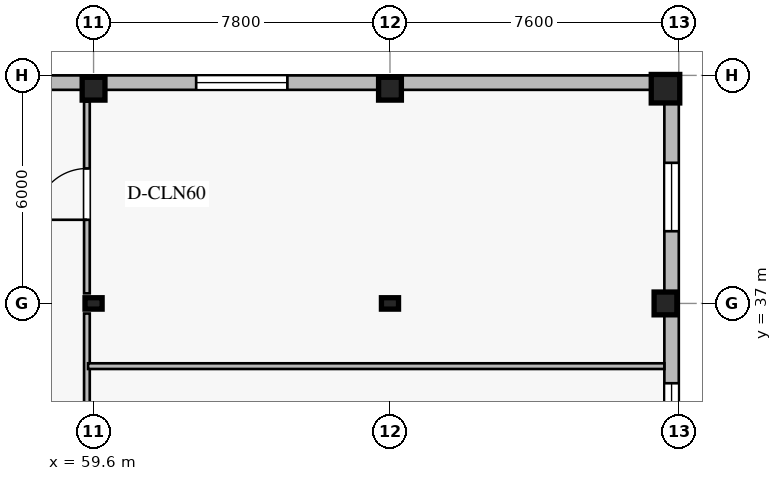
"""IFC4 building model, lengths in metres.
Left out: names, types, materials, properties, quantities, classifications, styles, units other than length and angle.
Written with IfcOpenShell. Run it as: python <this file> out.ifc"""

import sys

from ifc_helpers import new_model, si_unit, direction, frame, frame_2d, origin, origin_2d, place, context, subcontext, project, spatial, rectangle, i_section, extrude, element, fill, save


model = new_model("IFC4")
c1 = context("Model", 3, precision=1e-05, world=origin(), true_north=direction((0.0, 1.0)))
c2 = subcontext(c1, "Body", "Model", "MODEL_VIEW")
j1 = project(units=[si_unit("LENGTHUNIT", "METRE"), si_unit("PLANEANGLEUNIT", "RADIAN")], contexts=[c1])
p1 = place(None, origin())
s1 = spatial("IfcSite", under=j1, at=p1, CompositionType="ELEMENT")
p2 = place(p1, origin())
s2 = spatial("IfcBuilding", under=s1, at=p2, CompositionType="ELEMENT")
p3 = place(p2, frame((0.0, 0.0, 5.2)))
s3 = spatial("IfcBuildingStorey", under=s2, at=p3, CompositionType="ELEMENT", Elevation=5.2)
p4 = place(p3, frame((59.6, 37.0, 0.0), z_axis=(0.0, 0.0, 1.0), x_axis=(1.0, 0.0, 0.0)))
e1 = element("IfcColumn", 1, at=p4, inside=s3, PredefinedType="COLUMN", context=c2, shape_type="SweptSolid", body=[
    extrude(i_section(OverallWidth=0.3, OverallDepth=0.45, WebThickness=0.014, FlangeThickness=0.026, at=origin_2d()), origin(), (0.0, 0.0, 1.0), 4.6),
])
p5 = place(p3, frame((59.6, 42.65, 0.0), z_axis=(0.0, 0.0, 1.0), x_axis=(1.0, 0.0, 0.0)))
e2 = element("IfcColumn", 2, at=p5, inside=s3, PredefinedType="COLUMN", context=c2, shape_type="SweptSolid", body=[
    extrude(rectangle(XDim=0.6, YDim=0.6, at=origin_2d()), origin(), (0.0, 0.0, 1.0), 4.6),
])
p6 = place(p3, frame((67.4, 37.0, 0.0), z_axis=(0.0, 0.0, 1.0), x_axis=(1.0, 0.0, 0.0)))
e3 = element("IfcColumn", 3, at=p6, inside=s3, PredefinedType="COLUMN", context=c2, shape_type="SweptSolid", body=[
    extrude(i_section(OverallWidth=0.3, OverallDepth=0.45, WebThickness=0.014, FlangeThickness=0.026, at=origin_2d()), origin(), (0.0, 0.0, 1.0), 4.6),
])
for number, where, z_axis, x_axis in (
    (4, (67.4, 42.65, 0.0), (0.0, 0.0, 1.0), (1.0, 0.0, 0.0)),
    (5, (74.65, 37.0, 0.0), (0.0, 0.0, 1.0), (1.0, 0.0, 0.0)),
):
    element("IfcColumn", number, at=place(p3, frame(where, z_axis=z_axis, x_axis=x_axis)), inside=s3, PredefinedType="COLUMN", context=c2, shape_type="SweptSolid", body=[
        extrude(rectangle(XDim=0.6, YDim=0.6, at=origin_2d()), origin(), (0.0, 0.0, 1.0), 4.6),
    ])
p7 = place(p3, frame((74.65, 42.65, 0.0), z_axis=(0.0, 0.0, 1.0), x_axis=(1.0, 0.0, 0.0)))
e6 = element("IfcColumn", 6, at=p7, inside=s3, PredefinedType="COLUMN", context=c2, shape_type="SweptSolid", body=[
    extrude(rectangle(XDim=0.75, YDim=0.75, at=origin_2d()), origin(), (0.0, 0.0, 1.0), 4.6),
])
p8 = place(p3, frame((52.0, 42.81, 0.0), z_axis=(0.0, 0.0, 1.0), x_axis=(1.0, 0.0, 0.0)))
e7 = element("IfcWall", 7, at=p8, inside=s3, PredefinedType="STANDARD", context=c2, shape_type="SweptSolid", body=[
    extrude(rectangle(XDim=23.0, YDim=0.38, at=frame_2d((11.5, 0.0))), origin(), (0.0, 0.0, 1.0), 4.34),
])
p9 = place(p8, frame((10.3, 0.0, 0.95)))
e8 = element("IfcOpeningElement", 8, at=p9, cuts=e7, PredefinedType="OPENING", context=c2, shape_type="SweptSolid", body=[
    extrude(rectangle(XDim=2.4, YDim=1.8, at=frame_2d((1.2, 0.9))), frame((0.0, 0.2, 0.0), z_axis=(0.0, -1.0, 0.0), x_axis=(1.0, 0.0, 0.0)), (0.0, 0.0, 1.0), 0.4),
])
p10 = place(p3, frame((74.81, 42.62, 0.0), z_axis=(0.0, 0.0, 1.0), x_axis=(0.0, -1.0, 0.0)))
e9 = element("IfcWall", 9, at=p10, inside=s3, PredefinedType="STANDARD", context=c2, shape_type="SweptSolid", body=[
    extrude(rectangle(XDim=35.24, YDim=0.38, at=frame_2d((17.62, 0.0))), origin(), (0.0, 0.0, 1.0), 4.34),
])
p11 = place(p10, frame((31.52, 0.0, 0.9)))
e10 = element("IfcOpeningElement", 10, at=p11, cuts=e9, PredefinedType="OPENING", context=c2, shape_type="SweptSolid", body=[
    extrude(rectangle(XDim=1.8, YDim=1.8, at=frame_2d((0.9, 0.9))), frame((0.0, 0.2, 0.0), z_axis=(0.0, -1.0, 0.0), x_axis=(1.0, 0.0, 0.0)), (0.0, 0.0, 1.0), 0.4),
])
p12 = place(p10, frame((25.72, 0.0, 0.9)))
e11 = element("IfcOpeningElement", 11, at=p12, cuts=e9, PredefinedType="OPENING", context=c2, shape_type="SweptSolid", body=[
    extrude(rectangle(XDim=1.8, YDim=1.8, at=frame_2d((0.9, 0.9))), frame((0.0, 0.2, 0.0), z_axis=(0.0, -1.0, 0.0), x_axis=(1.0, 0.0, 0.0)), (0.0, 0.0, 1.0), 0.4),
])
p13 = place(p10, frame((19.72, 0.0, 0.9)))
e12 = element("IfcOpeningElement", 12, at=p13, cuts=e9, PredefinedType="OPENING", context=c2, shape_type="SweptSolid", body=[
    extrude(rectangle(XDim=1.8, YDim=1.8, at=frame_2d((0.9, 0.9))), frame((0.0, 0.2, 0.0), z_axis=(0.0, -1.0, 0.0), x_axis=(1.0, 0.0, 0.0)), (0.0, 0.0, 1.0), 0.4),
])
p14 = place(p10, frame((13.72, 0.0, 0.9)))
e13 = element("IfcOpeningElement", 13, at=p14, cuts=e9, PredefinedType="OPENING", context=c2, shape_type="SweptSolid", body=[
    extrude(rectangle(XDim=1.8, YDim=1.8, at=frame_2d((0.9, 0.9))), frame((0.0, 0.2, 0.0), z_axis=(0.0, -1.0, 0.0), x_axis=(1.0, 0.0, 0.0)), (0.0, 0.0, 1.0), 0.4),
])
p15 = place(p10, frame((7.72, 0.0, 0.9)))
e14 = element("IfcOpeningElement", 14, at=p15, cuts=e9, PredefinedType="OPENING", context=c2, shape_type="SweptSolid", body=[
    extrude(rectangle(XDim=1.8, YDim=1.8, at=frame_2d((0.9, 0.9))), frame((0.0, 0.2, 0.0), z_axis=(0.0, -1.0, 0.0), x_axis=(1.0, 0.0, 0.0)), (0.0, 0.0, 1.0), 0.4),
])
p16 = place(p10, frame((1.92, 0.0, 0.9)))
e15 = element("IfcOpeningElement", 15, at=p16, cuts=e9, PredefinedType="OPENING", context=c2, shape_type="SweptSolid", body=[
    extrude(rectangle(XDim=1.8, YDim=1.8, at=frame_2d((0.9, 0.9))), frame((0.0, 0.2, 0.0), z_axis=(0.0, -1.0, 0.0), x_axis=(1.0, 0.0, 0.0)), (0.0, 0.0, 1.0), 0.4),
])
p17 = place(p3, frame((59.425, 31.265, 0.0), z_axis=(0.0, 0.0, 1.0), x_axis=(0.0, 1.0, 0.0)))
e16 = element("IfcWall", 16, at=p17, inside=s3, PredefinedType="PARTITIONING", context=c2, shape_type="SweptSolid", body=[
    extrude(rectangle(XDim=5.47, YDim=0.15, at=frame_2d((2.735, 0.0))), origin(), (0.0, 0.0, 1.0), 3.98),
])
p18 = place(p3, frame((59.425, 37.265, 0.0), z_axis=(0.0, 0.0, 1.0), x_axis=(0.0, 1.0, 0.0)))
e17 = element("IfcWall", 17, at=p18, inside=s3, PredefinedType="PARTITIONING", context=c2, shape_type="SweptSolid", body=[
    extrude(rectangle(XDim=5.045, YDim=0.15, at=frame_2d((2.522, 0.0))), origin(), (0.0, 0.0, 1.0), 3.98),
])
p19 = place(p18, frame((1.936, 0.0, 0.0)))
e18 = element("IfcOpeningElement", 18, at=p19, cuts=e17, PredefinedType="OPENING", context=c2, shape_type="SweptSolid", body=[
    extrude(rectangle(XDim=1.35, YDim=2.2, at=frame_2d((0.675, 1.1))), frame((0.0, 0.085, 0.0), z_axis=(0.0, -1.0, 0.0), x_axis=(1.0, 0.0, 0.0)), (0.0, 0.0, 1.0), 0.17),
])
p20 = place(p3, frame((59.455, 35.35, 0.0), z_axis=(0.0, 0.0, 1.0), x_axis=(1.0, 0.0, 0.0)))
e19 = element("IfcWall", 19, at=p20, inside=s3, PredefinedType="PARTITIONING", context=c2, shape_type="SweptSolid", body=[
    extrude(rectangle(XDim=15.165, YDim=0.15, at=frame_2d((7.583, 0.0))), origin(), (0.0, 0.0, 1.0), 3.98),
])
p21 = place(p15, origin())
e20 = element("IfcWindow", 20, at=p21, inside=s3, PartitioningType="DOUBLE_PANEL_VERTICAL", PredefinedType="WINDOW", context=c2, shape_type="SweptSolid", body=[
    extrude(rectangle(XDim=1.8, YDim=1.8, at=frame_2d((0.9, 0.9))), frame((0.0, 0.03, 0.0), z_axis=(0.0, -1.0, 0.0), x_axis=(1.0, 0.0, 0.0)), (0.0, 0.0, 1.0), 0.06),
])
fill(e14, e20)
p22 = place(p16, origin())
e21 = element("IfcWindow", 21, at=p22, inside=s3, PartitioningType="DOUBLE_PANEL_VERTICAL", PredefinedType="WINDOW", context=c2, shape_type="SweptSolid", body=[
    extrude(rectangle(XDim=1.8, YDim=1.8, at=frame_2d((0.9, 0.9))), frame((0.0, 0.03, 0.0), z_axis=(0.0, -1.0, 0.0), x_axis=(1.0, 0.0, 0.0)), (0.0, 0.0, 1.0), 0.06),
])
fill(e15, e21)
p23 = place(p9, origin())
e22 = element("IfcWindow", 22, at=p23, inside=s3, PartitioningType="TRIPLE_PANEL_VERTICAL", PredefinedType="WINDOW", context=c2, shape_type="SweptSolid", body=[
    extrude(rectangle(XDim=2.4, YDim=1.8, at=frame_2d((1.2, 0.9))), frame((0.0, 0.03, 0.0), z_axis=(0.0, -1.0, 0.0), x_axis=(1.0, 0.0, 0.0)), (0.0, 0.0, 1.0), 0.06),
])
fill(e8, e22)
p24 = place(p19, origin())
e23 = element("IfcDoor", 23, at=p24, inside=s3, OperationType="SINGLE_SWING_LEFT", PredefinedType="DOOR", context=c2, shape_type="SweptSolid", body=[
    extrude(rectangle(XDim=1.35, YDim=2.2, at=frame_2d((0.675, 1.1))), frame((0.0, 0.025, 0.0), z_axis=(0.0, -1.0, 0.0), x_axis=(1.0, 0.0, 0.0)), (0.0, 0.0, 1.0), 0.05),
])
fill(e18, e23)
save(model, sys.argv[1])
